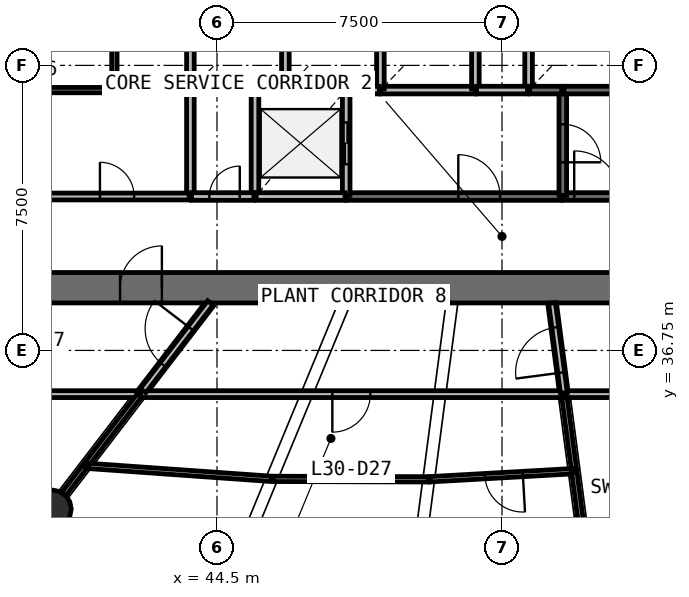
"""IFC4 building model, lengths in metres.
Left out: names, types, materials, properties, quantities, classifications, styles, units other than length and angle.
Written with IfcOpenShell. Run it as: python <this file> out.ifc"""

import sys

from ifc_helpers import new_model, si_unit, direction, frame, frame_2d, origin, origin_2d, place, context, subcontext, project, spatial, rectangle, circle, extrude, source, transform, mapped, element, fill, save


model = new_model("IFC4")
c1 = context("Model", 3, precision=1e-05, world=origin(), true_north=direction((0.0, 1.0)))
c2 = subcontext(c1, "Body", "Model", "MODEL_VIEW")
j1 = project(units=[si_unit("LENGTHUNIT", "METRE"), si_unit("PLANEANGLEUNIT", "RADIAN")], contexts=[c1])
p1 = place(None, origin())
s1 = spatial("IfcSite", under=j1, at=p1, CompositionType="ELEMENT")
p2 = place(p1, origin())
s2 = spatial("IfcBuilding", under=s1, at=p2, CompositionType="ELEMENT")
p3 = place(p2, frame((0.0, 0.0, 129.0)))
s3 = spatial("IfcBuildingStorey", under=s2, at=p3, CompositionType="ELEMENT", Elevation=129.0)
p4 = place(p3, frame((39.8, 38.4, 0.0), z_axis=(0.0, 0.0, 1.0), x_axis=(1.0, 0.0, 0.0)))
e1 = element("IfcWall", 1, at=p4, inside=s3, PredefinedType="SHEAR", context=c2, shape_type="SweptSolid", body=[
    extrude(rectangle(XDim=24.4, YDim=0.8, at=frame_2d((12.2, 0.0))), origin(), (0.0, 0.0, 1.0), 4.1),
])
p5 = place(p4, frame((21.65, 0.0, 0.0)))
e2 = element("IfcOpeningElement", 2, at=p5, cuts=e1, PredefinedType="OPENING", context=c2, shape_type="SweptSolid", body=[
    extrude(rectangle(XDim=1.1, YDim=2.1, at=frame_2d((0.55, 1.05))), frame((0.0, 0.41, 0.0), z_axis=(0.0, -1.0, 0.0), x_axis=(1.0, 0.0, 0.0)), (0.0, 0.0, 1.0), 0.82),
])
p6 = place(p4, frame((2.15, 0.0, 0.0)))
e3 = element("IfcOpeningElement", 3, at=p6, cuts=e1, PredefinedType="OPENING", context=c2, shape_type="SweptSolid", body=[
    extrude(rectangle(XDim=1.1, YDim=2.1, at=frame_2d((0.55, 1.05))), frame((0.0, 0.41, 0.0), z_axis=(0.0, -1.0, 0.0), x_axis=(1.0, 0.0, 0.0)), (0.0, 0.0, 1.0), 0.82),
])
m1 = source(origin(), c2, "Body", "SweptSolid", [
    extrude(circle(Radius=0.5, at=origin_2d()), origin(), (0.0, 0.0, 1.0), 3.78),
])
p7 = place(p3, frame((40.165, 32.576, 0.0), z_axis=(0.0, 0.0, 1.0), x_axis=(1.0, 0.0, 0.0)))
e4 = element("IfcColumn", 4, at=p7, inside=s3, PredefinedType="COLUMN", context=c2, shape_type="MappedRepresentation", body=[
    mapped(m1, transform((0.0, 0.0, 0.0), scale=1.0)),
])
p8 = place(p3, frame((53.6, 40.8, 0.0), z_axis=(0.0, 0.0, 1.0), x_axis=(1.0, 0.0, 0.0)))
e5 = element("IfcWall", 5, at=p8, inside=s3, PredefinedType="SOLIDWALL", context=c2, shape_type="SweptSolid", body=[
    extrude(rectangle(XDim=6.6, YDim=0.2, at=frame_2d((3.3, 0.0))), origin(), (0.0, 0.0, 1.0), 3.78),
])
p9 = place(p8, frame((0.3, 0.0, 0.0)))
e6 = element("IfcOpeningElement", 6, at=p9, cuts=e5, PredefinedType="OPENING", context=c2, shape_type="SweptSolid", body=[
    extrude(rectangle(XDim=1.2, YDim=2.1, at=frame_2d((0.6, 1.05))), frame((0.0, 0.11, 0.0), z_axis=(0.0, -1.0, 0.0), x_axis=(1.0, 0.0, 0.0)), (0.0, 0.0, 1.0), 0.22),
])
p10 = place(p3, frame((47.9, 40.8, 0.0), z_axis=(0.0, 0.0, 1.0), x_axis=(1.0, 0.0, 0.0)))
e7 = element("IfcWall", 7, at=p10, inside=s3, PredefinedType="SOLIDWALL", context=c2, shape_type="SweptSolid", body=[
    extrude(rectangle(XDim=5.67, YDim=0.2, at=frame_2d((2.835, 0.0))), origin(), (0.0, 0.0, 1.0), 3.78),
])
p11 = place(p10, frame((2.95, 0.0, 0.0)))
e8 = element("IfcOpeningElement", 8, at=p11, cuts=e7, PredefinedType="OPENING", context=c2, shape_type="SweptSolid", body=[
    extrude(rectangle(XDim=1.1, YDim=2.1, at=frame_2d((0.55, 1.05))), frame((0.0, 0.11, 0.0), z_axis=(0.0, -1.0, 0.0), x_axis=(1.0, 0.0, 0.0)), (0.0, 0.0, 1.0), 0.22),
])
for number, where, z_axis, x_axis in (
    (9, (43.8, 43.6, 0.0), (0.0, 0.0, 1.0), (0.0, -1.0, 0.0)),
    (10, (45.5, 43.6, 0.0), (0.0, 0.0, 1.0), (0.0, -1.0, 0.0)),
):
    element("IfcWall", number, at=place(p3, frame(where, z_axis=z_axis, x_axis=x_axis)), inside=s3, PredefinedType="SOLIDWALL", context=c2, shape_type="SweptSolid", body=[
        extrude(rectangle(XDim=2.8, YDim=0.2, at=frame_2d((1.4, 0.0))), origin(), (0.0, 0.0, 1.0), 3.78),
    ])
p12 = place(p3, frame((47.9, 40.83, 0.0), z_axis=(0.0, 0.0, 1.0), x_axis=(0.0, 1.0, 0.0)))
e11 = element("IfcWall", 11, at=p12, inside=s3, PredefinedType="SOLIDWALL", context=c2, shape_type="SweptSolid", body=[
    extrude(rectangle(XDim=2.77, YDim=0.2, at=frame_2d((1.385, 0.0))), origin(), (0.0, 0.0, 1.0), 3.78),
])
p13 = place(p12, frame((0.82, 0.0, 0.0)))
e12 = element("IfcOpeningElement", 12, at=p13, cuts=e11, PredefinedType="OPENING", context=c2, shape_type="SweptSolid", body=[
    extrude(rectangle(XDim=1.1, YDim=2.1, at=frame_2d((0.55, 1.05))), frame((0.0, 0.11, 0.0), z_axis=(0.0, -1.0, 0.0), x_axis=(1.0, 0.0, 0.0)), (0.0, 0.0, 1.0), 0.22),
])
p14 = place(p3, frame((53.6, 43.6, 0.0), z_axis=(0.0, 0.0, 1.0), x_axis=(0.0, -1.0, 0.0)))
e13 = element("IfcWall", 13, at=p14, inside=s3, PredefinedType="SOLIDWALL", context=c2, shape_type="SweptSolid", body=[
    extrude(rectangle(XDim=2.77, YDim=0.2, at=frame_2d((1.385, 0.0))), origin(), (0.0, 0.0, 1.0), 3.78),
])
p15 = place(p14, frame((0.9, 0.0, 0.0)))
e14 = element("IfcOpeningElement", 14, at=p15, cuts=e13, PredefinedType="OPENING", context=c2, shape_type="SweptSolid", body=[
    extrude(rectangle(XDim=1.0, YDim=2.1, at=frame_2d((0.5, 1.05))), frame((0.0, 0.11, 0.0), z_axis=(0.0, -1.0, 0.0), x_axis=(1.0, 0.0, 0.0)), (0.0, 0.0, 1.0), 0.22),
])
p16 = place(p3, frame((48.8, 43.6, 0.0), z_axis=(0.0, 0.0, 1.0), x_axis=(1.0, 0.0, 0.0)))
e15 = element("IfcWall", 15, at=p16, inside=s3, PredefinedType="SOLIDWALL", context=c2, shape_type="SweptSolid", body=[
    extrude(rectangle(XDim=2.5, YDim=0.2, at=frame_2d((1.25, 0.0))), origin(), (0.0, 0.0, 1.0), 3.78),
])
p17 = place(p3, frame((45.53, 40.8, 0.0), z_axis=(0.0, 0.0, 1.0), x_axis=(1.0, 0.0, 0.0)))
e16 = element("IfcWall", 16, at=p17, inside=s3, PredefinedType="SOLIDWALL", context=c2, shape_type="SweptSolid", body=[
    extrude(rectangle(XDim=2.34, YDim=0.2, at=frame_2d((1.17, 0.0))), origin(), (0.0, 0.0, 1.0), 3.78),
])
p18 = place(p3, frame((43.8, 45.99, 0.0), z_axis=(0.0, 0.0, 1.0), x_axis=(0.0, -1.0, 0.0)))
e17 = element("IfcWall", 17, at=p18, inside=s3, PredefinedType="SOLIDWALL", context=c2, shape_type="SweptSolid", body=[
    extrude(rectangle(XDim=2.36, YDim=0.2, at=frame_2d((1.18, 0.0))), origin(), (0.0, 0.0, 1.0), 3.78),
])
p19 = place(p3, frame((46.3, 43.6, 0.0), z_axis=(0.0, 0.0, 1.0), x_axis=(0.0, 1.0, 0.0)))
e18 = element("IfcWall", 18, at=p19, inside=s3, PredefinedType="SOLIDWALL", context=c2, shape_type="SweptSolid", body=[
    extrude(rectangle(XDim=2.39, YDim=0.2, at=frame_2d((1.195, 0.0))), origin(), (0.0, 0.0, 1.0), 3.78),
])
for number, where, z_axis, x_axis in (
    (19, (48.8, 43.63, 0.0), (0.0, 0.0, 1.0), (0.0, 1.0, 0.0)),
    (20, (51.3, 43.63, 0.0), (0.0, 0.0, 1.0), (0.0, 1.0, 0.0)),
):
    element("IfcWall", number, at=place(p3, frame(where, z_axis=z_axis, x_axis=x_axis)), inside=s3, PredefinedType="SOLIDWALL", context=c2, shape_type="SweptSolid", body=[
        extrude(rectangle(XDim=2.36, YDim=0.2, at=frame_2d((1.18, 0.0))), origin(), (0.0, 0.0, 1.0), 3.78),
    ])
p20 = place(p3, frame((52.7, 45.99, 0.0), z_axis=(0.0, 0.0, 1.0), x_axis=(0.0, -1.0, 0.0)))
e21 = element("IfcWall", 21, at=p20, inside=s3, PredefinedType="SOLIDWALL", context=c2, shape_type="SweptSolid", body=[
    extrude(rectangle(XDim=2.39, YDim=0.2, at=frame_2d((1.195, 0.0))), origin(), (0.0, 0.0, 1.0), 3.78),
])
p21 = place(p3, frame((43.83, 43.6, 0.0), z_axis=(0.0, 0.0, 1.0), x_axis=(1.0, 0.0, 0.0)))
e22 = element("IfcWall", 22, at=p21, inside=s3, PredefinedType="SOLIDWALL", context=c2, shape_type="SweptSolid", body=[
    extrude(rectangle(XDim=1.64, YDim=0.2, at=frame_2d((0.82, 0.0))), origin(), (0.0, 0.0, 1.0), 3.78),
])
p22 = place(p3, frame((43.83, 40.8, 0.0), z_axis=(0.0, 0.0, 1.0), x_axis=(1.0, 0.0, 0.0)))
e23 = element("IfcWall", 23, at=p22, inside=s3, PredefinedType="SOLIDWALL", context=c2, shape_type="SweptSolid", body=[
    extrude(rectangle(XDim=1.64, YDim=0.2, at=frame_2d((0.82, 0.0))), origin(), (0.0, 0.0, 1.0), 3.78),
])
p23 = place(p22, frame((0.47, 0.0, 0.0)))
e24 = element("IfcOpeningElement", 24, at=p23, cuts=e23, PredefinedType="OPENING", context=c2, shape_type="SweptSolid", body=[
    extrude(rectangle(XDim=0.8, YDim=2.1, at=frame_2d((0.4, 1.05))), frame((0.0, 0.11, 0.0), z_axis=(0.0, -1.0, 0.0), x_axis=(1.0, 0.0, 0.0)), (0.0, 0.0, 1.0), 0.22),
])
for number, where, z_axis, x_axis in (
    (25, (46.33, 43.6, 0.0), (0.0, 0.0, 1.0), (1.0, 0.0, 0.0)),
    (26, (53.63, 43.6, 0.0), (0.0, 0.0, 1.0), (1.0, 0.0, 0.0)),
):
    element("IfcWall", number, at=place(p3, frame(where, z_axis=z_axis, x_axis=x_axis)), inside=s3, PredefinedType="SOLIDWALL", context=c2, shape_type="SweptSolid", body=[
        extrude(rectangle(XDim=1.54, YDim=0.2, at=frame_2d((0.77, 0.0))), origin(), (0.0, 0.0, 1.0), 3.78),
    ])
p24 = place(p3, frame((52.67, 43.6, 0.0), z_axis=(0.0, 0.0, 1.0), x_axis=(-1.0, 0.0, 0.0)))
e27 = element("IfcWall", 27, at=p24, inside=s3, PredefinedType="SOLIDWALL", context=c2, shape_type="SweptSolid", body=[
    extrude(rectangle(XDim=1.34, YDim=0.2, at=frame_2d((0.67, 0.0))), origin(), (0.0, 0.0, 1.0), 3.78),
])
for number, where, z_axis, x_axis in (
    (28, (47.93, 43.6, 0.0), (0.0, 0.0, 1.0), (1.0, 0.0, 0.0)),
    (29, (52.73, 43.6, 0.0), (0.0, 0.0, 1.0), (1.0, 0.0, 0.0)),
):
    element("IfcWall", number, at=place(p3, frame(where, z_axis=z_axis, x_axis=x_axis)), inside=s3, PredefinedType="SOLIDWALL", context=c2, shape_type="SweptSolid", body=[
        extrude(rectangle(XDim=0.84, YDim=0.2, at=frame_2d((0.42, 0.0))), origin(), (0.0, 0.0, 1.0), 3.78),
    ])
p25 = place(p3, frame((45.53, 43.6, 0.0), z_axis=(0.0, 0.0, 1.0), x_axis=(1.0, 0.0, 0.0)))
e30 = element("IfcWall", 30, at=p25, inside=s3, PredefinedType="SOLIDWALL", context=c2, shape_type="SweptSolid", body=[
    extrude(rectangle(XDim=0.74, YDim=0.2, at=frame_2d((0.37, 0.0))), origin(), (0.0, 0.0, 1.0), 3.78),
])
p26 = place(p3, frame((67.4, 35.6, 0.0), z_axis=(0.0, 0.0, 1.0), x_axis=(-1.0, 0.0, 0.0)))
e31 = element("IfcWall", 31, at=p26, inside=s3, PredefinedType="PARTITIONING", context=c2, shape_type="SweptSolid", body=[
    extrude(rectangle(XDim=13.767, YDim=0.18, at=frame_2d((6.884, 0.0))), origin(), (0.0, 0.0, 1.0), 2.58),
])
p27 = place(p26, frame((6.317, 0.0, 0.0)))
e32 = element("IfcOpeningElement", 32, at=p27, cuts=e31, PredefinedType="OPENING", context=c2, shape_type="SweptSolid", body=[
    extrude(rectangle(XDim=1.0, YDim=2.1, at=frame_2d((0.5, 1.05))), frame((0.0, 0.1, 0.0), z_axis=(0.0, -1.0, 0.0), x_axis=(1.0, 0.0, 0.0)), (0.0, 0.0, 1.0), 0.2),
])
p28 = place(p3, frame((53.603, 35.6, 0.0), z_axis=(0.0, 0.0, 1.0), x_axis=(-1.0, 0.0, 0.0)))
e33 = element("IfcWall", 33, at=p28, inside=s3, PredefinedType="PARTITIONING", context=c2, shape_type="SweptSolid", body=[
    extrude(rectangle(XDim=11.117, YDim=0.18, at=frame_2d((5.559, 0.0))), origin(), (0.0, 0.0, 1.0), 2.58),
])
p29 = place(p28, frame((5.067, 0.0, 0.0)))
e34 = element("IfcOpeningElement", 34, at=p29, cuts=e33, PredefinedType="OPENING", context=c2, shape_type="SweptSolid", body=[
    extrude(rectangle(XDim=1.0, YDim=2.1, at=frame_2d((0.5, 1.05))), frame((0.0, 0.1, 0.0), z_axis=(0.0, -1.0, 0.0), x_axis=(1.0, 0.0, 0.0)), (0.0, 0.0, 1.0), 0.2),
])
p30 = place(p3, frame((36.63, 35.6, 0.0), z_axis=(0.0, 0.0, 1.0), x_axis=(1.0, 0.0, 0.0)))
e35 = element("IfcWall", 35, at=p30, inside=s3, PredefinedType="PARTITIONING", context=c2, shape_type="SweptSolid", body=[
    extrude(rectangle(XDim=5.825, YDim=0.18, at=frame_2d((2.913, 0.0))), origin(), (0.0, 0.0, 1.0), 2.58),
])
p31 = place(p3, frame((39.82, 40.8, 0.0), z_axis=(0.0, 0.0, 1.0), x_axis=(1.0, 0.0, 0.0)))
e36 = element("IfcWall", 36, at=p31, inside=s3, PredefinedType="PARTITIONING", context=c2, shape_type="SweptSolid", body=[
    extrude(rectangle(XDim=3.95, YDim=0.18, at=frame_2d((1.975, 0.0))), origin(), (0.0, 0.0, 1.0), 3.78),
])
p32 = place(p31, frame((1.6, 0.0, 0.0)))
e37 = element("IfcOpeningElement", 37, at=p32, cuts=e36, PredefinedType="OPENING", context=c2, shape_type="SweptSolid", body=[
    extrude(rectangle(XDim=0.9, YDim=2.1, at=frame_2d((0.45, 1.05))), frame((0.0, 0.1, 0.0), z_axis=(0.0, -1.0, 0.0), x_axis=(1.0, 0.0, 0.0)), (0.0, 0.0, 1.0), 0.2),
])
p33 = place(p3, frame((42.554, 35.69, 0.0), z_axis=(0.0, 0.0, 1.0), x_axis=(0.608737787706, 0.793371480341, 0.0)))
e38 = element("IfcWall", 38, at=p33, inside=s3, PredefinedType="PARTITIONING", context=c2, shape_type="SweptSolid", body=[
    extrude(rectangle(XDim=2.912, YDim=0.18, at=frame_2d((1.456, 0.0))), origin(), (0.0, 0.0, 1.0), 2.58),
])
p34 = place(p33, frame((0.862, 0.0, 0.0)))
e39 = element("IfcOpeningElement", 39, at=p34, cuts=e38, PredefinedType="OPENING", context=c2, shape_type="SweptSolid", body=[
    extrude(rectangle(XDim=1.2, YDim=2.1, at=frame_2d((0.6, 1.05))), frame((0.0, 0.1, 0.0), z_axis=(0.0, -1.0, 0.0), x_axis=(1.0, 0.0, 0.0)), (0.0, 0.0, 1.0), 0.2),
])
p35 = place(p3, frame((53.629, 35.63, 0.0), z_axis=(0.0, 0.0, 1.0), x_axis=(-0.13060507681, 0.991434472828, 0.0)))
e40 = element("IfcWall", 40, at=p35, inside=s3, PredefinedType="PARTITIONING", context=c2, shape_type="SweptSolid", body=[
    extrude(rectangle(XDim=2.391, YDim=0.18, at=frame_2d((1.195, 0.0))), origin(), (0.0, 0.0, 1.0), 2.58),
])
p36 = place(p35, frame((0.541, 0.0, 0.0)))
e41 = element("IfcOpeningElement", 41, at=p36, cuts=e40, PredefinedType="OPENING", context=c2, shape_type="SweptSolid", body=[
    extrude(rectangle(XDim=1.2, YDim=2.1, at=frame_2d((0.6, 1.05))), frame((0.0, 0.1, 0.0), z_axis=(0.0, -1.0, 0.0), x_axis=(1.0, 0.0, 0.0)), (0.0, 0.0, 1.0), 0.2),
])
p37 = place(p3, frame((41.04, 33.717, 0.0), z_axis=(0.0, 0.0, 1.0), x_axis=(0.997502909213, -0.070625392825, 0.0)))
e42 = element("IfcWall", 42, at=p37, inside=s3, PredefinedType="PARTITIONING", context=c2, shape_type="SweptSolid", body=[
    extrude(rectangle(XDim=4.912, YDim=0.14, at=frame_2d((2.456, 0.0))), origin(), (0.0, 0.0, 1.0), 2.58),
])
p38 = place(p3, frame((45.97, 33.37, 0.0), z_axis=(0.0, 0.0, 1.0), x_axis=(0.999995748074, -0.002916133527, 0.0)))
e43 = element("IfcWall", 43, at=p38, inside=s3, PredefinedType="PARTITIONING", context=c2, shape_type="SweptSolid", body=[
    extrude(rectangle(XDim=4.102, YDim=0.14, at=frame_2d((2.051, 0.0))), origin(), (0.0, 0.0, 1.0), 2.58),
])
p39 = place(p3, frame((53.899, 33.574, 0.0), z_axis=(0.0, 0.0, 1.0), x_axis=(-0.998406558005, -0.056430000288, 0.0)))
e44 = element("IfcWall", 44, at=p39, inside=s3, PredefinedType="PARTITIONING", context=c2, shape_type="SweptSolid", body=[
    extrude(rectangle(XDim=3.803, YDim=0.14, at=frame_2d((1.901, 0.0))), origin(), (0.0, 0.0, 1.0), 2.58),
])
p40 = place(p39, frame((1.353, 0.0, 0.0)))
e45 = element("IfcOpeningElement", 45, at=p40, cuts=e44, PredefinedType="OPENING", context=c2, shape_type="SweptSolid", body=[
    extrude(rectangle(XDim=1.0, YDim=2.1, at=frame_2d((0.5, 1.05))), frame((0.0, 0.08, 0.0), z_axis=(0.0, -1.0, 0.0), x_axis=(1.0, 0.0, 0.0)), (0.0, 0.0, 1.0), 0.16),
])
p41 = place(p3, frame((53.903, 33.545, 0.0), z_axis=(0.0, 0.0, 1.0), x_axis=(0.130536537493, -0.991443499338, 0.0)))
e46 = element("IfcWall", 46, at=p41, inside=s3, PredefinedType="PARTITIONING", context=c2, shape_type="SweptSolid", body=[
    extrude(rectangle(XDim=2.772, YDim=0.14, at=frame_2d((1.386, 0.0))), origin(), (0.0, 0.0, 1.0), 2.58),
])
p42 = place(p3, frame((41.8, 43.6, 0.0), z_axis=(0.0, 0.0, 1.0), x_axis=(0.0, 1.0, 0.0)))
e47 = element("IfcWall", 47, at=p42, inside=s3, PredefinedType="PARTITIONING", context=c2, shape_type="SweptSolid", body=[
    extrude(rectangle(XDim=2.39, YDim=0.14, at=frame_2d((1.195, 0.0))), origin(), (0.0, 0.0, 1.0), 2.98),
])
p43 = place(p3, frame((42.463, 35.571, 0.0), z_axis=(0.0, 0.0, 1.0), x_axis=(-0.608788650818, -0.79333245152, 0.0)))
e48 = element("IfcWall", 48, at=p43, inside=s3, PredefinedType="PARTITIONING", context=c2, shape_type="SweptSolid", body=[
    extrude(rectangle(XDim=2.253, YDim=0.14, at=frame_2d((1.126, 0.0))), origin(), (0.0, 0.0, 1.0), 2.58),
])
p44 = place(p3, frame((53.644, 35.51, 0.0), z_axis=(0.0, 0.0, 1.0), x_axis=(0.130498135038, -0.991448554768, 0.0)))
e49 = element("IfcWall", 49, at=p44, inside=s3, PredefinedType="PARTITIONING", context=c2, shape_type="SweptSolid", body=[
    extrude(rectangle(XDim=1.882, YDim=0.14, at=frame_2d((0.941, 0.0))), origin(), (0.0, 0.0, 1.0), 2.58),
])
p45 = place(p3, frame((43.77, 43.6, 0.0), z_axis=(0.0, 0.0, 1.0), x_axis=(-1.0, 0.0, 0.0)))
e50 = element("IfcWall", 50, at=p45, inside=s3, PredefinedType="PARTITIONING", context=c2, shape_type="SweptSolid", body=[
    extrude(rectangle(XDim=1.94, YDim=0.14, at=frame_2d((0.97, 0.0))), origin(), (0.0, 0.0, 1.0), 2.98),
])
p46 = place(p3, frame((41.77, 43.6, 0.0), z_axis=(0.0, 0.0, 1.0), x_axis=(-1.0, 0.0, 0.0)))
e51 = element("IfcWall", 51, at=p46, inside=s3, PredefinedType="PARTITIONING", context=c2, shape_type="SweptSolid", body=[
    extrude(rectangle(XDim=1.95, YDim=0.14, at=frame_2d((0.975, 0.0))), origin(), (0.0, 0.0, 1.0), 2.98),
])
p47 = place(p3, frame((41.022, 33.693, 0.0), z_axis=(0.0, 0.0, 1.0), x_axis=(-0.608783191851, -0.793336640601, 0.0)))
e52 = element("IfcWall", 52, at=p47, inside=s3, PredefinedType="PARTITIONING", context=c2, shape_type="SweptSolid", body=[
    extrude(rectangle(XDim=0.904, YDim=0.14, at=frame_2d((0.452, 0.0))), origin(), (0.0, 0.0, 1.0), 2.58),
])
m2 = source(origin(), c2, "Body", "SweptSolid", [
    extrude(rectangle(XDim=1.1, YDim=2.1, at=frame_2d((0.55, 1.05))), frame((0.0, 0.025, 0.0), z_axis=(0.0, -1.0, 0.0), x_axis=(1.0, 0.0, 0.0)), (0.0, 0.0, 1.0), 0.05),
])
p48 = place(p13, origin())
e53 = element("IfcDoor", 53, at=p48, inside=s3, OperationType="DOUBLE_DOOR_SLIDING", PredefinedType="USERDEFINED", context=c2, shape_type="MappedRepresentation", body=[
    mapped(m2, transform((0.0, 0.0, 0.0), scale=1.0)),
])
fill(e12, e53)
m3 = source(origin(), c2, "Body", "SweptSolid", [
    extrude(rectangle(XDim=1.2, YDim=2.1, at=frame_2d((0.6, 1.05))), frame((0.0, 0.025, 0.0), z_axis=(0.0, -1.0, 0.0), x_axis=(1.0, 0.0, 0.0)), (0.0, 0.0, 1.0), 0.05),
])
p49 = place(p9, origin())
e54 = element("IfcDoor", 54, at=p49, inside=s3, OperationType="SINGLE_SWING_LEFT", PredefinedType="DOOR", context=c2, shape_type="MappedRepresentation", body=[
    mapped(m3, transform((0.0, 0.0, 0.0), scale=1.0)),
])
fill(e6, e54)
m4 = source(origin(), c2, "Body", "SweptSolid", [
    extrude(rectangle(XDim=1.0, YDim=2.1, at=frame_2d((0.5, 1.05))), frame((0.0, 0.025, 0.0), z_axis=(0.0, -1.0, 0.0), x_axis=(1.0, 0.0, 0.0)), (0.0, 0.0, 1.0), 0.05),
])
p50 = place(p15, origin())
e55 = element("IfcDoor", 55, at=p50, inside=s3, OperationType="SINGLE_SWING_RIGHT", PredefinedType="DOOR", context=c2, shape_type="MappedRepresentation", body=[
    mapped(m4, transform((0.0, 0.0, 0.0), scale=1.0)),
])
fill(e14, e55)
m5 = source(origin(), c2, "Body", "SweptSolid", [
    extrude(rectangle(XDim=1.1, YDim=2.1, at=frame_2d((0.55, 1.05))), frame((0.0, 0.025, 0.0), z_axis=(0.0, -1.0, 0.0), x_axis=(1.0, 0.0, 0.0)), (0.0, 0.0, 1.0), 0.05),
])
p51 = place(p11, origin())
e56 = element("IfcDoor", 56, at=p51, inside=s3, OperationType="SINGLE_SWING_LEFT", PredefinedType="DOOR", context=c2, shape_type="MappedRepresentation", body=[
    mapped(m5, transform((0.0, 0.0, 0.0), scale=1.0)),
])
fill(e8, e56)
m6 = source(origin(), c2, "Body", "SweptSolid", [
    extrude(rectangle(XDim=0.8, YDim=2.1, at=frame_2d((0.4, 1.05))), frame((0.0, 0.025, 0.0), z_axis=(0.0, -1.0, 0.0), x_axis=(1.0, 0.0, 0.0)), (0.0, 0.0, 1.0), 0.05),
])
p52 = place(p23, origin())
e57 = element("IfcDoor", 57, at=p52, inside=s3, OperationType="SINGLE_SWING_RIGHT", PredefinedType="DOOR", context=c2, shape_type="MappedRepresentation", body=[
    mapped(m6, transform((0.0, 0.0, 0.0), scale=1.0)),
])
fill(e24, e57)
m7 = source(origin(), c2, "Body", "SweptSolid", [
    extrude(rectangle(XDim=1.1, YDim=2.1, at=frame_2d((0.55, 1.05))), frame((0.0, 0.025, 0.0), z_axis=(0.0, -1.0, 0.0), x_axis=(1.0, 0.0, 0.0)), (0.0, 0.0, 1.0), 0.05),
])
p53 = place(p6, origin())
e58 = element("IfcDoor", 58, at=p53, inside=s3, OperationType="SINGLE_SWING_RIGHT", PredefinedType="DOOR", context=c2, shape_type="MappedRepresentation", body=[
    mapped(m7, transform((0.0, 0.0, 0.0), scale=1.0)),
])
fill(e3, e58)
m8 = source(origin(), c2, "Body", "SweptSolid", [
    extrude(rectangle(XDim=1.0, YDim=2.1, at=frame_2d((0.5, 1.05))), frame((0.0, 0.025, 0.0), z_axis=(0.0, -1.0, 0.0), x_axis=(1.0, 0.0, 0.0)), (0.0, 0.0, 1.0), 0.05),
])
p54 = place(p29, origin())
e59 = element("IfcDoor", 59, at=p54, inside=s3, OperationType="SINGLE_SWING_RIGHT", PredefinedType="DOOR", context=c2, shape_type="MappedRepresentation", body=[
    mapped(m8, transform((0.0, 0.0, 0.0), scale=1.0)),
])
fill(e34, e59)
p55 = place(p40, origin())
e60 = element("IfcDoor", 60, at=p55, inside=s3, OperationType="SINGLE_SWING_LEFT", PredefinedType="DOOR", context=c2, shape_type="MappedRepresentation", body=[
    mapped(m8, transform((0.0, 0.0, 0.0), scale=1.0)),
])
fill(e45, e60)
m9 = source(origin(), c2, "Body", "SweptSolid", [
    extrude(rectangle(XDim=1.2, YDim=2.1, at=frame_2d((0.6, 1.05))), frame((0.0, 0.025, 0.0), z_axis=(0.0, -1.0, 0.0), x_axis=(1.0, 0.0, 0.0)), (0.0, 0.0, 1.0), 0.05),
])
p56 = place(p34, origin())
e61 = element("IfcDoor", 61, at=p56, inside=s3, OperationType="SINGLE_SWING_RIGHT", PredefinedType="DOOR", context=c2, shape_type="MappedRepresentation", body=[
    mapped(m9, transform((0.0, 0.0, 0.0), scale=1.0)),
])
fill(e39, e61)
p57 = place(p36, origin())
e62 = element("IfcDoor", 62, at=p57, inside=s3, OperationType="SINGLE_SWING_LEFT", PredefinedType="DOOR", context=c2, shape_type="MappedRepresentation", body=[
    mapped(m9, transform((0.0, 0.0, 0.0), scale=1.0)),
])
fill(e41, e62)
m10 = source(origin(), c2, "Body", "SweptSolid", [
    extrude(rectangle(XDim=0.9, YDim=2.1, at=frame_2d((0.45, 1.05))), frame((0.0, 0.025, 0.0), z_axis=(0.0, -1.0, 0.0), x_axis=(1.0, 0.0, 0.0)), (0.0, 0.0, 1.0), 0.05),
])
p58 = place(p32, origin())
e63 = element("IfcDoor", 63, at=p58, inside=s3, OperationType="SINGLE_SWING_LEFT", PredefinedType="DOOR", context=c2, shape_type="MappedRepresentation", body=[
    mapped(m10, transform((0.0, 0.0, 0.0), scale=1.0)),
])
fill(e37, e63)
save(model, sys.argv[1])
